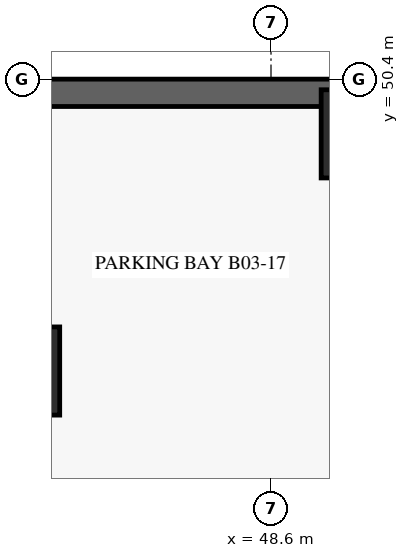
"""IFC4 building model, lengths in metres.
Left out: names, types, materials, properties, quantities, classifications, styles, units other than length and angle.
Written with IfcOpenShell. Run it as: python <this file> out.ifc"""

import sys

from ifc_helpers import new_model, si_unit, direction, frame, frame_2d, origin, origin_2d, place, context, subcontext, project, spatial, rectangle, extrude, source, transform, mapped, element, save


model = new_model("IFC4")
c1 = context("Model", 3, precision=1e-05, world=origin(), true_north=direction((0.0, 1.0)))
c2 = subcontext(c1, "Body", "Model", "MODEL_VIEW")
j1 = project(units=[si_unit("LENGTHUNIT", "METRE"), si_unit("PLANEANGLEUNIT", "RADIAN")], contexts=[c1])
p1 = place(None, origin())
s1 = spatial("IfcSite", under=j1, at=p1, CompositionType="ELEMENT")
p2 = place(p1, origin())
s2 = spatial("IfcBuilding", under=s1, at=p2, CompositionType="ELEMENT")
p3 = place(p2, frame((0.0, 0.0, -10.8)))
s3 = spatial("IfcBuildingStorey", under=s2, at=p3, CompositionType="ELEMENT", Elevation=-10.8)
p4 = place(p3, frame((64.575, 50.175, 0.0), z_axis=(0.0, 0.0, 1.0), x_axis=(-1.0, 0.0, 0.0)))
e1 = element("IfcWall", 1, at=p4, inside=s3, PredefinedType="USERDEFINED", context=c2, shape_type="SweptSolid", body=[
    extrude(rectangle(XDim=64.35, YDim=0.45, at=frame_2d((32.175, 0.0))), origin(), (0.0, 0.0, 1.0), 3.238),
])
m1 = source(origin(), c2, "Body", "SweptSolid", [
    extrude(rectangle(XDim=1.45, YDim=1.45, at=origin_2d()), origin(), (0.0, 0.0, 1.0), 3.24),
])
for number, where, z_axis, x_axis in (
    (2, (44.4, 45.6, 0.0), (0.0, 0.0, 1.0), (1.0, 0.0, 0.0)),
    (3, (50.15, 49.5, 0.0), (0.0, 0.0, 1.0), (1.0, 0.0, 0.0)),
):
    element("IfcColumn", number, at=place(p3, frame(where, z_axis=z_axis, x_axis=x_axis)), inside=s3, PredefinedType="COLUMN", context=c2, shape_type="MappedRepresentation", body=[
        mapped(m1, transform((0.0, 0.0, 0.0), scale=1.0)),
    ])
save(model, sys.argv[1])
